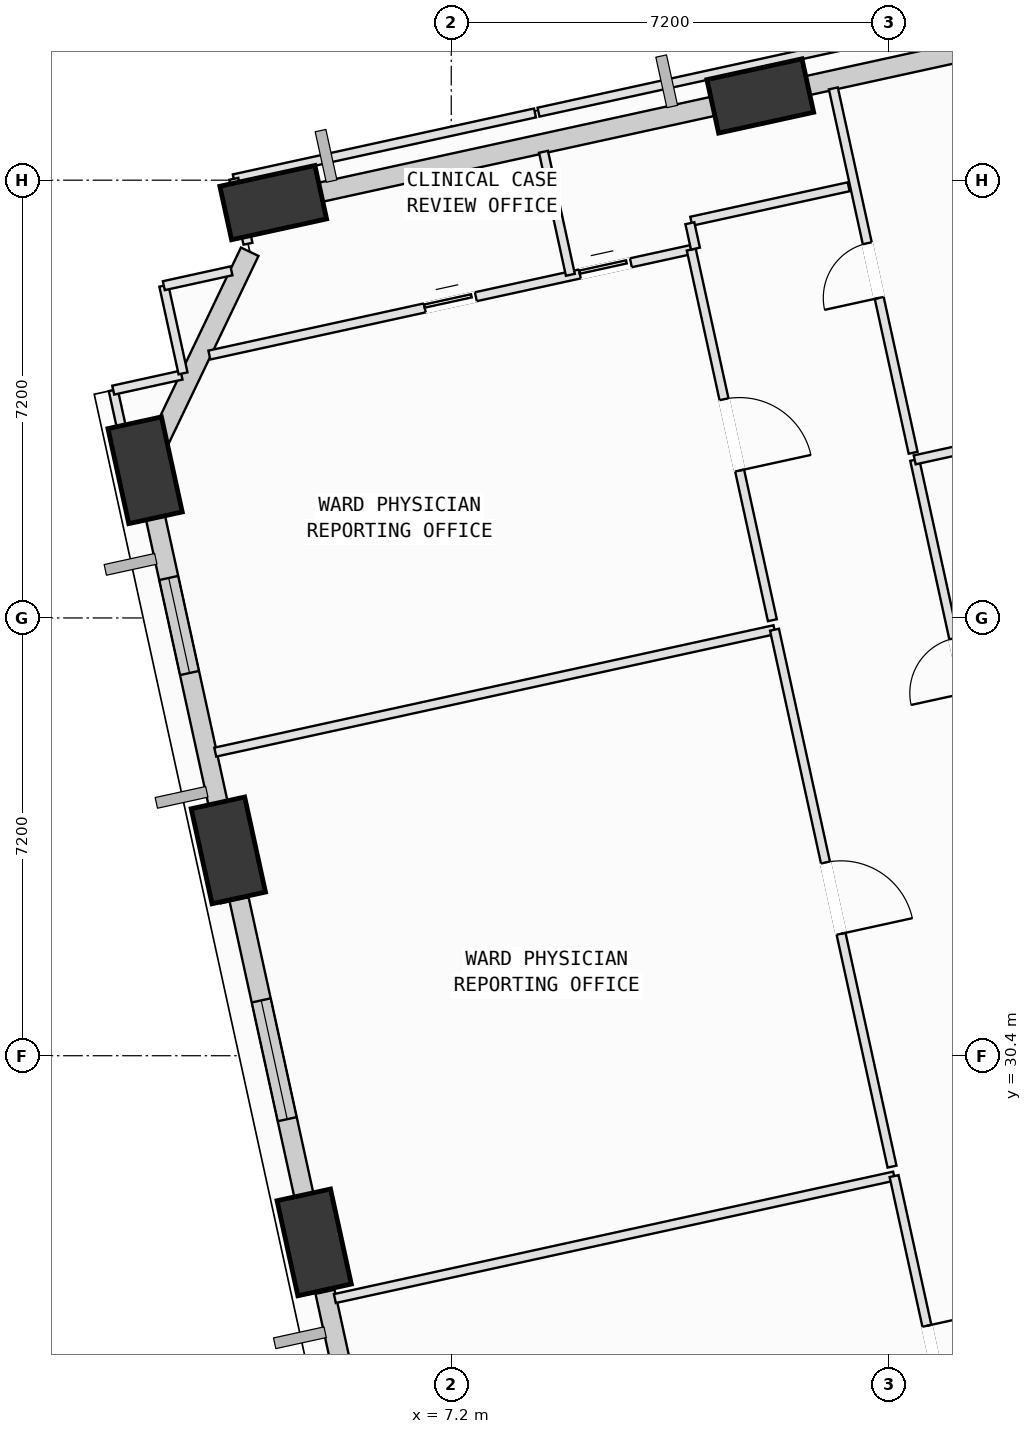
"""IFC4 building model, lengths in metres.
Left out: names, types, materials, properties, quantities, classifications, styles, units other than length and angle.
Written with IfcOpenShell. Run it as: python <this file> out.ifc"""

import sys

from ifc_helpers import new_model, si_unit, direction, frame, frame_2d, origin, origin_2d, place, context, subcontext, project, spatial, rectangle, extrude, element, fill, save


model = new_model("IFC4")
c1 = context("Model", 3, precision=1e-05, world=origin(), true_north=direction((0.0, 1.0)))
c2 = subcontext(c1, "Body", "Model", "MODEL_VIEW")
j1 = project(units=[si_unit("LENGTHUNIT", "METRE"), si_unit("PLANEANGLEUNIT", "RADIAN")], contexts=[c1])
p1 = place(None, origin())
s1 = spatial("IfcSite", under=j1, at=p1, CompositionType="ELEMENT")
p2 = place(p1, origin())
s2 = spatial("IfcBuilding", under=s1, at=p2, CompositionType="ELEMENT")
p3 = place(p2, frame((0.0, 0.0, 75.0)))
s3 = spatial("IfcBuildingStorey", under=s2, at=p3, CompositionType="ELEMENT", Elevation=75.0)
p4 = place(p3, frame((12.282, 46.185, 0.002), z_axis=(-0.087224395165, -0.088376072377, 0.992260840061), x_axis=(0.844339325102, -0.535150235142, 0.026558048014)))
e1 = element("IfcColumn", 1, at=p4, inside=s3, PredefinedType="COLUMN", context=c2, shape_type="SweptSolid", body=[
    extrude(rectangle(XDim=1.6, YDim=0.9, at=origin_2d()), origin(), (0.0, 0.0, 1.0), 4.028),
])
p5 = place(p3, frame((4.272, 44.431, 0.002), z_axis=(-0.079484110883, -0.120948825761, 0.989471403156), x_axis=(0.932582589558, -0.359626895734, 0.030954959493)))
e2 = element("IfcColumn", 2, at=p5, inside=s3, PredefinedType="COLUMN", context=c2, shape_type="SweptSolid", body=[
    extrude(rectangle(XDim=1.6, YDim=0.9, at=origin_2d()), origin(), (0.0, 0.0, 1.0), 4.039),
])
p6 = place(p3, frame((2.165, 40.029, 0.002), z_axis=(-0.06142443746, -0.12943870138, 0.989683111439), x_axis=(0.221249744093, 0.965121885376, 0.139958197715)))
e3 = element("IfcColumn", 3, at=p6, inside=s3, PredefinedType="COLUMN", context=c2, shape_type="SweptSolid", body=[
    extrude(rectangle(XDim=1.6, YDim=0.9, at=origin_2d()), origin(), (0.0, 0.0, 1.0), 4.038),
])
p7 = place(p3, frame((3.534, 33.777, 0.002), z_axis=(-0.03586170814, -0.123880393827, 0.991648922711), x_axis=(0.06391871487, 0.989971135308, 0.125982336647)))
e4 = element("IfcColumn", 4, at=p7, inside=s3, PredefinedType="COLUMN", context=c2, shape_type="SweptSolid", body=[
    extrude(rectangle(XDim=1.6, YDim=0.9, at=origin_2d()), origin(), (0.0, 0.0, 1.0), 4.03),
])
p8 = place(p3, frame((4.946, 27.33, 0.002), z_axis=(-0.009462642807, -0.11797974525, 0.992970915033), x_axis=(-0.13564841396, 0.983987596197, 0.115619714235)))
e5 = element("IfcColumn", 5, at=p8, inside=s3, PredefinedType="COLUMN", context=c2, shape_type="SweptSolid", body=[
    extrude(rectangle(XDim=1.6, YDim=0.9, at=origin_2d()), origin(), (0.0, 0.0, 1.0), 4.025),
])
p9 = place(p3, frame((12.656, 46.267, 0.0), z_axis=(0.0, 0.0, 1.0), x_axis=(0.976859060718, 0.213884023465, 0.0)))
e6 = element("IfcWall", 6, at=p9, inside=s3, PredefinedType="SOLIDWALL", context=c2, shape_type="SweptSolid", body=[
    extrude(rectangle(XDim=7.003, YDim=0.32, at=frame_2d((3.501, 0.0))), origin(), (0.0, 0.0, 1.0), 3.165),
])
p10 = place(p3, frame((4.627, 44.509, 0.0), z_axis=(0.0, 0.0, 1.0), x_axis=(0.976857659369, 0.213890423658, 0.0)))
e7 = element("IfcWall", 7, at=p10, inside=s3, PredefinedType="SOLIDWALL", context=c2, shape_type="SweptSolid", body=[
    extrude(rectangle(XDim=7.035, YDim=0.32, at=frame_2d((3.517, 0.0))), origin(), (0.0, 0.0, 1.0), 3.165),
])
p11 = place(p3, frame((2.303, 40.316, 0.0), z_axis=(0.0, 0.0, 1.0), x_axis=(0.431724105142, 0.902005707875, 0.0)))
e8 = element("IfcWall", 8, at=p11, inside=s3, PredefinedType="SOLIDWALL", context=c2, shape_type="SweptSolid", body=[
    extrude(rectangle(XDim=3.666, YDim=0.32, at=frame_2d((1.833, 0.0))), origin(), (0.0, 0.0, 1.0), 3.165),
])
p12 = place(p3, frame((3.456, 34.135, 0.0), z_axis=(0.0, 0.0, 1.0), x_axis=(-0.213900404294, 0.976855473979, 0.0)))
e9 = element("IfcWall", 9, at=p12, inside=s3, PredefinedType="SOLIDWALL", context=c2, shape_type="SweptSolid", body=[
    extrude(rectangle(XDim=5.223, YDim=0.32, at=frame_2d((2.611, 0.0))), origin(), (0.0, 0.0, 1.0), 3.165),
])
p13 = place(p12, frame((2.62, 0.0, 0.75)))
e10 = element("IfcOpeningElement", 10, at=p13, cuts=e9, PredefinedType="OPENING", context=c2, shape_type="SweptSolid", body=[
    extrude(rectangle(XDim=1.6, YDim=1.95, at=frame_2d((0.8, 0.975))), frame((0.0, 0.17, 0.0), z_axis=(0.0, -1.0, 0.0), x_axis=(1.0, 0.0, 0.0)), (0.0, 0.0, 1.0), 0.34),
])
p14 = place(p3, frame((4.865, 27.697, 0.0), z_axis=(0.0, 0.0, 1.0), x_axis=(-0.213870791001, 0.976861957882, 0.0)))
e11 = element("IfcWall", 11, at=p14, inside=s3, PredefinedType="SOLIDWALL", context=c2, shape_type="SweptSolid", body=[
    extrude(rectangle(XDim=5.401, YDim=0.32, at=frame_2d((2.7, 0.0))), origin(), (0.0, 0.0, 1.0), 3.165),
])
p15 = place(p14, frame((1.698, 0.0, 0.75)))
e12 = element("IfcOpeningElement", 12, at=p15, cuts=e11, PredefinedType="OPENING", context=c2, shape_type="SweptSolid", body=[
    extrude(rectangle(XDim=2.0, YDim=1.95, at=frame_2d((1.0, 0.975))), frame((0.0, 0.17, 0.0), z_axis=(0.0, -1.0, 0.0), x_axis=(1.0, 0.0, 0.0)), (0.0, 0.0, 1.0), 0.34),
])
p16 = place(p3, frame((6.287, 21.205, 0.0), z_axis=(0.0, 0.0, 1.0), x_axis=(-0.21388700502, 0.976858407899, 0.0)))
e13 = element("IfcWall", 13, at=p16, inside=s3, PredefinedType="SOLIDWALL", context=c2, shape_type="SweptSolid", body=[
    extrude(rectangle(XDim=5.438, YDim=0.32, at=frame_2d((2.719, 0.0))), origin(), (0.0, 0.0, 1.0), 3.165),
])
p17 = place(p16, frame((1.843, 0.0, 0.75)))
e14 = element("IfcOpeningElement", 14, at=p17, cuts=e13, PredefinedType="OPENING", context=c2, shape_type="SweptSolid", body=[
    extrude(rectangle(XDim=1.4, YDim=1.85, at=frame_2d((0.7, 0.925))), frame((0.0, 0.17, 0.0), z_axis=(0.0, -1.0, 0.0), x_axis=(1.0, 0.0, 0.0)), (0.0, 0.0, 1.0), 0.34),
])
p18 = place(p3, frame((5.286, 26.406, 0.0), z_axis=(0.0, 0.0, 1.0), x_axis=(0.976854150105, 0.213906450166, 0.0)))
e15 = element("IfcWall", 15, at=p18, inside=s3, PredefinedType="PARTITIONING", context=c2, shape_type="SweptSolid", body=[
    extrude(rectangle(XDim=9.415, YDim=0.15, at=frame_2d((4.708, 0.0))), origin(), (0.0, 0.0, 1.0), 3.78),
])
p19 = place(p3, frame((14.483, 28.42, 0.0), z_axis=(0.0, 0.0, 1.0), x_axis=(0.213959387343, -0.976842556694, 0.0)))
e16 = element("IfcWall", 16, at=p19, inside=s3, PredefinedType="PARTITIONING", context=c2, shape_type="SweptSolid", body=[
    extrude(rectangle(XDim=6.24, YDim=0.15, at=frame_2d((3.12, 0.0))), origin(), (0.0, 0.0, 1.0), 3.78),
])
p20 = place(p19, frame((2.52, 0.0, 0.0)))
e17 = element("IfcOpeningElement", 17, at=p20, cuts=e16, PredefinedType="OPENING", context=c2, shape_type="SweptSolid", body=[
    extrude(rectangle(XDim=1.2, YDim=2.15, at=frame_2d((0.6, 1.075))), frame((0.0, 0.085, 0.0), z_axis=(0.0, -1.0, 0.0), x_axis=(1.0, 0.0, 0.0)), (0.0, 0.0, 1.0), 0.17),
])
p21 = place(p3, frame((3.319, 35.393, 0.0), z_axis=(0.0, 0.0, 1.0), x_axis=(0.976854150105, 0.213906450166, 0.0)))
e18 = element("IfcWall", 18, at=p21, inside=s3, PredefinedType="PARTITIONING", context=c2, shape_type="SweptSolid", body=[
    extrude(rectangle(XDim=9.415, YDim=0.15, at=frame_2d((4.708, 0.0))), origin(), (0.0, 0.0, 1.0), 3.78),
])
p22 = place(p3, frame((12.516, 37.407, 0.0), z_axis=(0.0, 0.0, 1.0), x_axis=(0.213809634747, -0.976875345215, 0.0)))
e19 = element("IfcWall", 19, at=p22, inside=s3, PredefinedType="PARTITIONING", context=c2, shape_type="SweptSolid", body=[
    extrude(rectangle(XDim=9.04, YDim=0.15, at=frame_2d((4.52, 0.0))), origin(), (0.0, 0.0, 1.0), 2.865),
])
p23 = place(p22, frame((3.92, 0.0, 0.0)))
e20 = element("IfcOpeningElement", 20, at=p23, cuts=e19, PredefinedType="OPENING", context=c2, shape_type="SweptSolid", body=[
    extrude(rectangle(XDim=1.2, YDim=2.15, at=frame_2d((0.6, 1.075))), frame((0.0, 0.085, 0.0), z_axis=(0.0, -1.0, 0.0), x_axis=(1.0, 0.0, 0.0)), (0.0, 0.0, 1.0), 0.17),
])
for number, where, z_axis, x_axis in (
    (21, (4.895, 26.485, 0.0), (0.0, 0.0, 1.0), (-0.214, 0.977, 0.0)),
    (22, (3.486, 32.923, 0.0), (0.0, 0.0, 1.0), (-0.214, 0.977, 0.0)),
):
    element("IfcWall", number, at=place(p3, frame(where, z_axis=z_axis, x_axis=x_axis)), inside=s3, PredefinedType="PARTITIONING", context=c2, shape_type="SweptSolid", body=[
        extrude(rectangle(XDim=1.19, YDim=0.15, at=frame_2d((0.595, 0.0))), origin(), (0.0, 0.0, 1.0), 3.165),
    ])
p24 = place(p3, frame((3.222, 41.924, 0.0), z_axis=(0.0, 0.0, 1.0), x_axis=(0.976867612807, 0.213844960309, 0.0)))
e23 = element("IfcWall", 23, at=p24, inside=s3, PredefinedType="PARTITIONING", context=c2, shape_type="SweptSolid", body=[
    extrude(rectangle(XDim=8.113, YDim=0.15, at=frame_2d((4.056, 0.0))), origin(), (0.0, 0.0, 1.0), 3.78),
])
p25 = place(p24, frame((3.626, 0.0, 0.0)))
e24 = element("IfcOpeningElement", 24, at=p25, cuts=e23, PredefinedType="OPENING", context=c2, shape_type="SweptSolid", body=[
    extrude(rectangle(XDim=0.86, YDim=2.06, at=frame_2d((0.43, 1.03))), frame((0.0, 0.085, 0.0), z_axis=(0.0, -1.0, 0.0), x_axis=(1.0, 0.0, 0.0)), (0.0, 0.0, 1.0), 0.17),
])
p26 = place(p24, frame((6.237, 0.0, 0.0)))
e25 = element("IfcOpeningElement", 25, at=p26, cuts=e23, PredefinedType="OPENING", context=c2, shape_type="SweptSolid", body=[
    extrude(rectangle(XDim=0.86, YDim=2.06, at=frame_2d((0.43, 1.03))), frame((0.0, 0.085, 0.0), z_axis=(0.0, -1.0, 0.0), x_axis=(1.0, 0.0, 0.0)), (0.0, 0.0, 1.0), 0.17),
])
p27 = place(p3, frame((11.147, 43.659, 0.0), z_axis=(0.0, 0.0, 1.0), x_axis=(0.213772719363, -0.97688342419, 0.0)))
e26 = element("IfcWall", 26, at=p27, inside=s3, PredefinedType="PARTITIONING", context=c2, shape_type="SweptSolid", body=[
    extrude(rectangle(XDim=6.24, YDim=0.15, at=frame_2d((3.12, 0.0))), origin(), (0.0, 0.0, 1.0), 2.865),
])
p28 = place(p27, frame((2.52, 0.0, 0.0)))
e27 = element("IfcOpeningElement", 27, at=p28, cuts=e26, PredefinedType="OPENING", context=c2, shape_type="SweptSolid", body=[
    extrude(rectangle(XDim=1.2, YDim=2.15, at=frame_2d((0.6, 1.075))), frame((0.0, 0.085, 0.0), z_axis=(0.0, -1.0, 0.0), x_axis=(1.0, 0.0, 0.0)), (0.0, 0.0, 1.0), 0.17),
])
p29 = place(p3, frame((2.114, 39.188, 0.0), z_axis=(0.0, 0.0, 1.0), x_axis=(-0.213970304256, 0.976840165481, 0.0)))
e28 = element("IfcWall", 28, at=p29, inside=s3, PredefinedType="PARTITIONING", context=c2, shape_type="SweptSolid", body=[
    extrude(rectangle(XDim=2.21, YDim=0.15, at=frame_2d((1.105, 0.0))), origin(), (0.0, 0.0, 1.0), 3.165),
])
p30 = place(p3, frame((1.641, 41.347, 0.0), z_axis=(0.0, 0.0, 1.0), x_axis=(0.976634662055, 0.214906344423, 0.0)))
e29 = element("IfcWall", 29, at=p30, inside=s3, PredefinedType="PARTITIONING", context=c2, shape_type="SweptSolid", body=[
    extrude(rectangle(XDim=1.15, YDim=0.15, at=frame_2d((0.575, 0.0))), origin(), (0.0, 0.0, 1.0), 3.78),
])
p31 = place(p3, frame((16.304, 33.43, 0.0), z_axis=(0.0, 0.0, 1.0), x_axis=(-0.213833454661, 0.976870131424, 0.0)))
e30 = element("IfcWall", 30, at=p31, inside=s3, PredefinedType="PARTITIONING", context=c2, shape_type="SweptSolid", body=[
    extrude(rectangle(XDim=6.93, YDim=0.15, at=frame_2d((3.465, 0.0))), origin(), (0.0, 0.0, 1.0), 3.78),
])
p32 = place(p31, frame((3.005, 0.0, 0.0)))
e31 = element("IfcOpeningElement", 31, at=p32, cuts=e30, PredefinedType="OPENING", context=c2, shape_type="SweptSolid", body=[
    extrude(rectangle(XDim=0.92, YDim=2.1, at=frame_2d((0.46, 1.05))), frame((0.0, 0.085, 0.0), z_axis=(0.0, -1.0, 0.0), x_axis=(1.0, 0.0, 0.0)), (0.0, 0.0, 1.0), 0.17),
])
p33 = place(p3, frame((14.822, 40.2, 0.0), z_axis=(0.0, 0.0, 1.0), x_axis=(0.976860427396, 0.213877781427, 0.0)))
e32 = element("IfcWall", 32, at=p33, inside=s3, PredefinedType="PARTITIONING", context=c2, shape_type="SweptSolid", body=[
    extrude(rectangle(XDim=8.412, YDim=0.15, at=frame_2d((4.206, 0.0))), origin(), (0.0, 0.0, 1.0), 3.78),
])
p34 = place(p3, frame((14.796, 40.317, 0.0), z_axis=(0.0, 0.0, 1.0), x_axis=(-0.213853530585, 0.976865736658, 0.0)))
e33 = element("IfcWall", 33, at=p34, inside=s3, PredefinedType="PARTITIONING", context=c2, shape_type="SweptSolid", body=[
    extrude(rectangle(XDim=6.135, YDim=0.15, at=frame_2d((3.067, 0.0))), origin(), (0.0, 0.0, 1.0), 3.78),
])
p35 = place(p34, frame((2.607, 0.0, 0.0)))
e34 = element("IfcOpeningElement", 34, at=p35, cuts=e33, PredefinedType="OPENING", context=c2, shape_type="SweptSolid", body=[
    extrude(rectangle(XDim=0.92, YDim=2.1, at=frame_2d((0.46, 1.05))), frame((0.0, 0.085, 0.0), z_axis=(0.0, -1.0, 0.0), x_axis=(1.0, 0.0, 0.0)), (0.0, 0.0, 1.0), 0.17),
])
p36 = place(p3, frame((3.624, 44.822, 0.0), z_axis=(0.0, 0.0, 1.0), x_axis=(0.976877708266, 0.213798837911, 0.0)))
e35 = element("IfcWall", 35, at=p36, inside=s3, PredefinedType="PARTITIONING", context=c2, shape_type="SweptSolid", body=[
    extrude(rectangle(XDim=5.07, YDim=0.15, at=frame_2d((2.535, 0.0))), origin(), (0.0, 0.0, 1.0), 3.78),
])
p37 = place(p3, frame((8.717, 45.267, 0.0), z_axis=(0.0, 0.0, 1.0), x_axis=(0.213383954957, -0.976968416975, 0.0)))
e36 = element("IfcWall", 36, at=p37, inside=s3, PredefinedType="PARTITIONING", context=c2, shape_type="SweptSolid", body=[
    extrude(rectangle(XDim=2.071, YDim=0.15, at=frame_2d((1.035, 0.0))), origin(), (0.0, 0.0, 1.0), 3.78),
])
p38 = place(p3, frame((2.789, 41.623, 0.0), z_axis=(0.0, 0.0, 1.0), x_axis=(-0.214180229602, 0.976794159098, 0.0)))
e37 = element("IfcWall", 37, at=p38, inside=s3, PredefinedType="PARTITIONING", context=c2, shape_type="SweptSolid", body=[
    extrude(rectangle(XDim=1.476, YDim=0.15, at=frame_2d((0.738, 0.0))), origin(), (0.0, 0.0, 1.0), 3.78),
])
p39 = place(p3, frame((2.473, 43.065, 0.0), z_axis=(0.0, 0.0, 1.0), x_axis=(0.976738866434, 0.214432242905, 0.0)))
e38 = element("IfcWall", 38, at=p39, inside=s3, PredefinedType="PARTITIONING", context=c2, shape_type="SweptSolid", body=[
    extrude(rectangle(XDim=1.138, YDim=0.15, at=frame_2d((0.569, 0.0))), origin(), (0.0, 0.0, 1.0), 3.78),
])
p40 = place(p3, frame((3.857, 43.755, 0.0), z_axis=(0.0, 0.0, 1.0), x_axis=(-0.213236902245, 0.977000523808, 0.0)))
e39 = element("IfcWall", 39, at=p40, inside=s3, PredefinedType="PARTITIONING", context=c2, shape_type="SweptSolid", body=[
    extrude(rectangle(XDim=1.092, YDim=0.15, at=frame_2d((0.546, 0.0))), origin(), (0.0, 0.0, 1.0), 2.865),
])
p41 = place(p3, frame((8.635, 45.919, 0.0), z_axis=(0.0, 0.0, 1.0), x_axis=(0.976864747358, 0.21385804958, 0.0)))
e40 = element("IfcWall", 40, at=p41, inside=s3, PredefinedType="PARTITIONING", context=c2, shape_type="SweptSolid", body=[
    extrude(rectangle(XDim=6.641, YDim=0.15, at=frame_2d((3.32, 0.0))), origin(), (0.0, 0.0, 1.0), 3.78),
])
p42 = place(p3, frame((13.736, 44.692, 0.0), z_axis=(0.0, 0.0, 1.0), x_axis=(-0.976858535273, -0.213886423282, 0.0)))
e41 = element("IfcWall", 41, at=p42, inside=s3, PredefinedType="PARTITIONING", context=c2, shape_type="SweptSolid", body=[
    extrude(rectangle(XDim=2.65, YDim=0.15, at=frame_2d((1.325, 0.0))), origin(), (0.0, 0.0, 1.0), 3.78),
])
p43 = place(p3, frame((11.124, 44.092, 0.0), z_axis=(0.0, 0.0, 1.0), x_axis=(0.215057657882, -0.976601353566, 0.0)))
e42 = element("IfcWall", 42, at=p43, inside=s3, PredefinedType="PARTITIONING", context=c2, shape_type="SweptSolid", body=[
    extrude(rectangle(XDim=0.428, YDim=0.15, at=frame_2d((0.214, 0.0))), origin(), (0.0, 0.0, 1.0), 3.78),
])
p44 = place(p13, origin())
e43 = element("IfcWindow", 43, at=p44, inside=s3, PartitioningType="SINGLE_PANEL", PredefinedType="WINDOW", context=c2, shape_type="SweptSolid", body=[
    extrude(rectangle(XDim=1.6, YDim=1.95, at=frame_2d((0.8, 0.975))), frame((0.0, 0.03, 0.0), z_axis=(0.0, -1.0, 0.0), x_axis=(1.0, 0.0, 0.0)), (0.0, 0.0, 1.0), 0.06),
])
fill(e10, e43)
p45 = place(p15, origin())
e44 = element("IfcWindow", 44, at=p45, inside=s3, PartitioningType="SINGLE_PANEL", PredefinedType="WINDOW", context=c2, shape_type="SweptSolid", body=[
    extrude(rectangle(XDim=2.0, YDim=1.95, at=frame_2d((1.0, 0.975))), frame((0.0, 0.03, 0.0), z_axis=(0.0, -1.0, 0.0), x_axis=(1.0, 0.0, 0.0)), (0.0, 0.0, 1.0), 0.06),
])
fill(e12, e44)
p46 = place(p20, origin())
e45 = element("IfcDoor", 45, at=p46, inside=s3, OperationType="SINGLE_SWING_LEFT", PredefinedType="DOOR", context=c2, shape_type="SweptSolid", body=[
    extrude(rectangle(XDim=1.2, YDim=2.15, at=frame_2d((0.6, 1.075))), frame((0.0, 0.025, 0.0), z_axis=(0.0, -1.0, 0.0), x_axis=(1.0, 0.0, 0.0)), (0.0, 0.0, 1.0), 0.05),
])
fill(e17, e45)
p47 = place(p23, origin())
e46 = element("IfcDoor", 46, at=p47, inside=s3, OperationType="SINGLE_SWING_RIGHT", PredefinedType="DOOR", context=c2, shape_type="SweptSolid", body=[
    extrude(rectangle(XDim=1.2, YDim=2.15, at=frame_2d((0.6, 1.075))), frame((0.0, 0.025, 0.0), z_axis=(0.0, -1.0, 0.0), x_axis=(1.0, 0.0, 0.0)), (0.0, 0.0, 1.0), 0.05),
])
fill(e20, e46)
p48 = place(p28, origin())
e47 = element("IfcDoor", 47, at=p48, inside=s3, OperationType="SINGLE_SWING_RIGHT", PredefinedType="DOOR", context=c2, shape_type="SweptSolid", body=[
    extrude(rectangle(XDim=1.2, YDim=2.15, at=frame_2d((0.6, 1.075))), frame((0.0, 0.025, 0.0), z_axis=(0.0, -1.0, 0.0), x_axis=(1.0, 0.0, 0.0)), (0.0, 0.0, 1.0), 0.05),
])
fill(e27, e47)
p49 = place(p32, origin())
e48 = element("IfcDoor", 48, at=p49, inside=s3, OperationType="SINGLE_SWING_LEFT", PredefinedType="DOOR", context=c2, shape_type="SweptSolid", body=[
    extrude(rectangle(XDim=0.92, YDim=2.1, at=frame_2d((0.46, 1.05))), frame((0.0, 0.025, 0.0), z_axis=(0.0, -1.0, 0.0), x_axis=(1.0, 0.0, 0.0)), (0.0, 0.0, 1.0), 0.05),
])
fill(e31, e48)
p50 = place(p35, origin())
e49 = element("IfcDoor", 49, at=p50, inside=s3, OperationType="SINGLE_SWING_LEFT", PredefinedType="DOOR", context=c2, shape_type="SweptSolid", body=[
    extrude(rectangle(XDim=0.92, YDim=2.1, at=frame_2d((0.46, 1.05))), frame((0.0, 0.025, 0.0), z_axis=(0.0, -1.0, 0.0), x_axis=(1.0, 0.0, 0.0)), (0.0, 0.0, 1.0), 0.05),
])
fill(e34, e49)
p51 = place(p25, origin())
e50 = element("IfcDoor", 50, at=p51, inside=s3, OperationType="SLIDING_TO_LEFT", PredefinedType="DOOR", context=c2, shape_type="SweptSolid", body=[
    extrude(rectangle(XDim=0.86, YDim=2.06, at=frame_2d((0.43, 1.03))), frame((0.0, 0.025, 0.0), z_axis=(0.0, -1.0, 0.0), x_axis=(1.0, 0.0, 0.0)), (0.0, 0.0, 1.0), 0.05),
])
fill(e24, e50)
p52 = place(p26, origin())
e51 = element("IfcDoor", 51, at=p52, inside=s3, OperationType="SLIDING_TO_LEFT", PredefinedType="DOOR", context=c2, shape_type="SweptSolid", body=[
    extrude(rectangle(XDim=0.86, YDim=2.06, at=frame_2d((0.43, 1.03))), frame((0.0, 0.025, 0.0), z_axis=(0.0, -1.0, 0.0), x_axis=(1.0, 0.0, 0.0)), (0.0, 0.0, 1.0), 0.05),
])
fill(e25, e51)
save(model, sys.argv[1])
